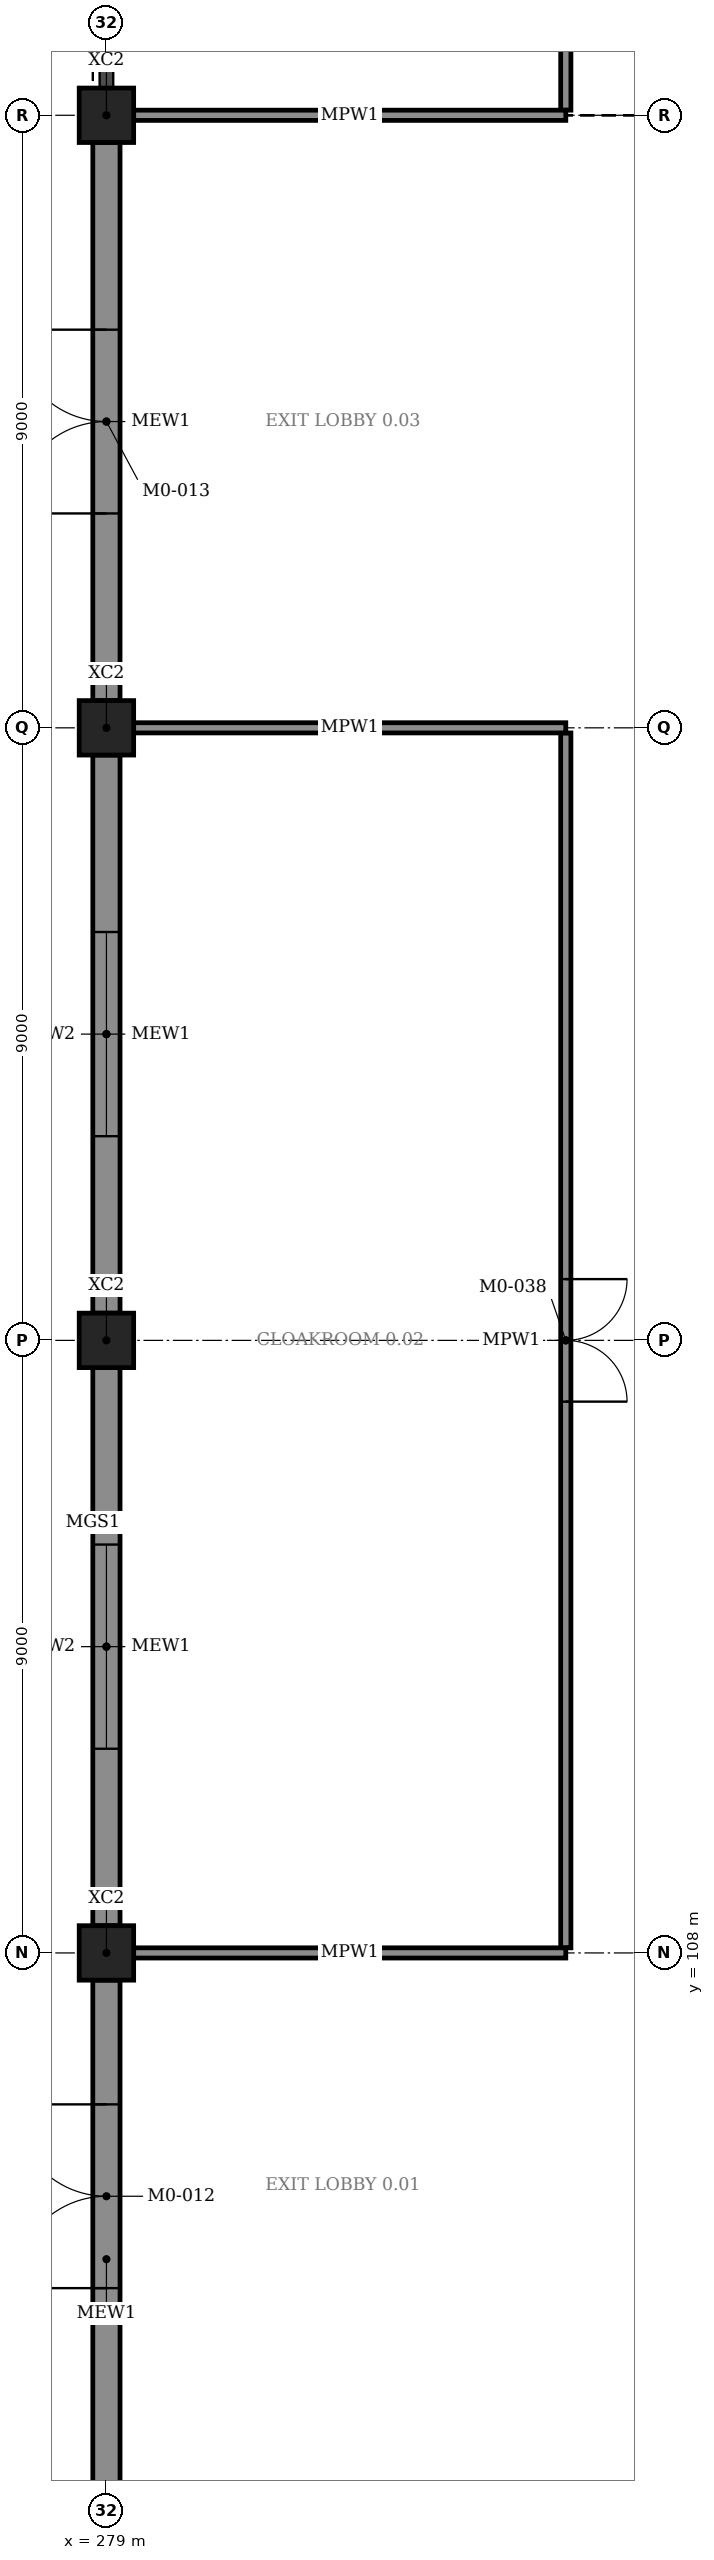
"""IFC4 building model, lengths in metres.
Left out: names, types, materials, properties, quantities, classifications, styles, units other than length and angle.
Written with IfcOpenShell. Run it as: python <this file> out.ifc"""

import sys

from ifc_helpers import new_model, si_unit, direction, frame, frame_2d, origin, origin_2d, place, context, subcontext, project, spatial, rectangle, extrude, element, fill, save


model = new_model("IFC4")
c1 = context("Model", 3, precision=1e-05, world=origin(), true_north=direction((0.0, 1.0)))
c2 = subcontext(c1, "Body", "Model", "MODEL_VIEW")
j1 = project(units=[si_unit("LENGTHUNIT", "METRE"), si_unit("PLANEANGLEUNIT", "RADIAN")], contexts=[c1])
p1 = place(None, origin())
s1 = spatial("IfcSite", under=j1, at=p1, CompositionType="ELEMENT")
p2 = place(p1, origin())
s2 = spatial("IfcBuilding", under=s1, at=p2, CompositionType="ELEMENT")
p3 = place(p2, origin())
s3 = spatial("IfcBuildingStorey", under=s2, at=p3, CompositionType="ELEMENT", Elevation=0.0)
for number, where, z_axis, x_axis in (
    (1, (279.0, 108.0, -0.3), (0.0, 0.0, 1.0), (1.0, 0.0, 0.0)),
    (2, (279.0, 117.0, -0.3), (0.0, 0.0, 1.0), (1.0, 0.0, 0.0)),
    (3, (279.0, 126.0, -0.3), (0.0, 0.0, 1.0), (1.0, 0.0, 0.0)),
    (4, (279.0, 135.0, -0.3), (0.0, 0.0, 1.0), (1.0, 0.0, 0.0)),
):
    element("IfcColumn", number, at=place(p3, frame(where, z_axis=z_axis, x_axis=x_axis)), inside=s3, PredefinedType="COLUMN", context=c2, shape_type="SweptSolid", body=[
        extrude(rectangle(XDim=0.8, YDim=0.8, at=origin_2d()), origin(), (0.0, 0.0, 1.0), 6.3),
    ])
p4 = place(p3, frame((279.0, 99.4, 0.0), z_axis=(0.0, 0.0, 1.0), x_axis=(0.0, 1.0, 0.0)))
e5 = element("IfcWall", 5, at=p4, inside=s3, PredefinedType="STANDARD", context=c2, shape_type="SweptSolid", body=[
    extrude(rectangle(XDim=8.2, YDim=0.4, at=frame_2d((4.1, 0.0))), origin(), (0.0, 0.0, 1.0), 4.82),
])
p5 = place(p4, frame((3.675, 0.0, 0.0)))
e6 = element("IfcOpeningElement", 6, at=p5, cuts=e5, PredefinedType="OPENING", context=c2, shape_type="SweptSolid", body=[
    extrude(rectangle(XDim=2.7, YDim=2.4, at=frame_2d((1.35, 1.2))), frame((0.0, 0.21, 0.0), z_axis=(0.0, -1.0, 0.0), x_axis=(1.0, 0.0, 0.0)), (0.0, 0.0, 1.0), 0.42),
])
p6 = place(p3, frame((279.0, 108.4, 0.0), z_axis=(0.0, 0.0, 1.0), x_axis=(0.0, 1.0, 0.0)))
e7 = element("IfcWall", 7, at=p6, inside=s3, PredefinedType="STANDARD", context=c2, shape_type="SweptSolid", body=[
    extrude(rectangle(XDim=8.2, YDim=0.4, at=frame_2d((4.1, 0.0))), origin(), (0.0, 0.0, 1.0), 4.82),
])
p7 = place(p6, frame((2.6, 0.0, 0.9)))
e8 = element("IfcOpeningElement", 8, at=p7, cuts=e7, PredefinedType="OPENING", context=c2, shape_type="SweptSolid", body=[
    extrude(rectangle(XDim=3.0, YDim=2.1, at=frame_2d((1.5, 1.05))), frame((0.0, 0.21, 0.0), z_axis=(0.0, -1.0, 0.0), x_axis=(1.0, 0.0, 0.0)), (0.0, 0.0, 1.0), 0.42),
])
p8 = place(p3, frame((279.0, 117.4, 0.0), z_axis=(0.0, 0.0, 1.0), x_axis=(0.0, 1.0, 0.0)))
e9 = element("IfcWall", 9, at=p8, inside=s3, PredefinedType="STANDARD", context=c2, shape_type="SweptSolid", body=[
    extrude(rectangle(XDim=8.2, YDim=0.4, at=frame_2d((4.1, 0.0))), origin(), (0.0, 0.0, 1.0), 4.82),
])
p9 = place(p8, frame((2.6, 0.0, 0.9)))
e10 = element("IfcOpeningElement", 10, at=p9, cuts=e9, PredefinedType="OPENING", context=c2, shape_type="SweptSolid", body=[
    extrude(rectangle(XDim=3.0, YDim=2.1, at=frame_2d((1.5, 1.05))), frame((0.0, 0.21, 0.0), z_axis=(0.0, -1.0, 0.0), x_axis=(1.0, 0.0, 0.0)), (0.0, 0.0, 1.0), 0.42),
])
p10 = place(p3, frame((279.0, 126.4, 0.0), z_axis=(0.0, 0.0, 1.0), x_axis=(0.0, 1.0, 0.0)))
e11 = element("IfcWall", 11, at=p10, inside=s3, PredefinedType="STANDARD", context=c2, shape_type="SweptSolid", body=[
    extrude(rectangle(XDim=8.2, YDim=0.4, at=frame_2d((4.1, 0.0))), origin(), (0.0, 0.0, 1.0), 4.82),
])
p11 = place(p10, frame((2.75, 0.0, 0.0)))
e12 = element("IfcOpeningElement", 12, at=p11, cuts=e11, PredefinedType="OPENING", context=c2, shape_type="SweptSolid", body=[
    extrude(rectangle(XDim=2.7, YDim=2.4, at=frame_2d((1.35, 1.2))), frame((0.0, 0.21, 0.0), z_axis=(0.0, -1.0, 0.0), x_axis=(1.0, 0.0, 0.0)), (0.0, 0.0, 1.0), 0.42),
])
for number, where, z_axis, x_axis in (
    (13, (279.4, 108.0, 0.0), (0.0, 0.0, 1.0), (1.0, 0.0, 0.0)),
    (14, (279.4, 126.0, 0.0), (0.0, 0.0, 1.0), (1.0, 0.0, 0.0)),
):
    element("IfcWall", number, at=place(p3, frame(where, z_axis=z_axis, x_axis=x_axis)), inside=s3, PredefinedType="PARTITIONING", context=c2, shape_type="SweptSolid", body=[
        extrude(rectangle(XDim=6.35, YDim=0.15, at=frame_2d((3.175, 0.0))), origin(), (0.0, 0.0, 1.0), 4.82),
    ])
p12 = place(p3, frame((285.75, 108.075, 0.0), z_axis=(0.0, 0.0, 1.0), x_axis=(0.0, 1.0, 0.0)))
e15 = element("IfcWall", 15, at=p12, inside=s3, PredefinedType="PARTITIONING", context=c2, shape_type="SweptSolid", body=[
    extrude(rectangle(XDim=17.85, YDim=0.15, at=frame_2d((8.925, 0.0))), origin(), (0.0, 0.0, 1.0), 4.82),
])
p13 = place(p12, frame((8.025, 0.0, 0.0)))
e16 = element("IfcOpeningElement", 16, at=p13, cuts=e15, PredefinedType="OPENING", context=c2, shape_type="SweptSolid", body=[
    extrude(rectangle(XDim=1.8, YDim=2.4, at=frame_2d((0.9, 1.2))), frame((0.0, 0.085, 0.0), z_axis=(0.0, -1.0, 0.0), x_axis=(1.0, 0.0, 0.0)), (0.0, 0.0, 1.0), 0.17),
])
p14 = place(p3, frame((279.4, 135.0, 0.0), z_axis=(0.0, 0.0, 1.0), x_axis=(1.0, 0.0, 0.0)))
e17 = element("IfcWall", 17, at=p14, inside=s3, PredefinedType="PARTITIONING", context=c2, shape_type="SweptSolid", body=[
    extrude(rectangle(XDim=6.35, YDim=0.15, at=frame_2d((3.175, 0.0))), origin(), (0.0, 0.0, 1.0), 4.82),
])
p15 = place(p3, frame((285.75, 135.075, 0.0), z_axis=(0.0, 0.0, 1.0), x_axis=(0.0, 1.0, 0.0)))
e18 = element("IfcWall", 18, at=p15, inside=s3, PredefinedType="PARTITIONING", context=c2, shape_type="SweptSolid", body=[
    extrude(rectangle(XDim=17.85, YDim=0.15, at=frame_2d((8.925, 0.0))), origin(), (0.0, 0.0, 1.0), 4.82),
])
p16 = place(p15, frame((8.025, 0.0, 0.0)))
e19 = element("IfcOpeningElement", 19, at=p16, cuts=e18, PredefinedType="OPENING", context=c2, shape_type="SweptSolid", body=[
    extrude(rectangle(XDim=1.8, YDim=2.4, at=frame_2d((0.9, 1.2))), frame((0.0, 0.085, 0.0), z_axis=(0.0, -1.0, 0.0), x_axis=(1.0, 0.0, 0.0)), (0.0, 0.0, 1.0), 0.17),
])
p17 = place(p5, origin())
e20 = element("IfcDoor", 20, at=p17, inside=s3, OperationType="DOUBLE_DOOR_SINGLE_SWING", PredefinedType="DOOR", context=c2, shape_type="SweptSolid", body=[
    extrude(rectangle(XDim=2.7, YDim=2.4, at=frame_2d((1.35, 1.2))), frame((0.0, 0.025, 0.0), z_axis=(0.0, -1.0, 0.0), x_axis=(1.0, 0.0, 0.0)), (0.0, 0.0, 1.0), 0.05),
])
fill(e6, e20)
p18 = place(p7, origin())
e21 = element("IfcWindow", 21, at=p18, inside=s3, PartitioningType="TRIPLE_PANEL_VERTICAL", PredefinedType="WINDOW", context=c2, shape_type="SweptSolid", body=[
    extrude(rectangle(XDim=3.0, YDim=2.1, at=frame_2d((1.5, 1.05))), frame((0.0, 0.03, 0.0), z_axis=(0.0, -1.0, 0.0), x_axis=(1.0, 0.0, 0.0)), (0.0, 0.0, 1.0), 0.06),
])
fill(e8, e21)
p19 = place(p9, origin())
e22 = element("IfcWindow", 22, at=p19, inside=s3, PartitioningType="TRIPLE_PANEL_VERTICAL", PredefinedType="WINDOW", context=c2, shape_type="SweptSolid", body=[
    extrude(rectangle(XDim=3.0, YDim=2.1, at=frame_2d((1.5, 1.05))), frame((0.0, 0.03, 0.0), z_axis=(0.0, -1.0, 0.0), x_axis=(1.0, 0.0, 0.0)), (0.0, 0.0, 1.0), 0.06),
])
fill(e10, e22)
p20 = place(p11, origin())
e23 = element("IfcDoor", 23, at=p20, inside=s3, OperationType="DOUBLE_DOOR_SINGLE_SWING", PredefinedType="DOOR", context=c2, shape_type="SweptSolid", body=[
    extrude(rectangle(XDim=2.7, YDim=2.4, at=frame_2d((1.35, 1.2))), frame((0.0, 0.025, 0.0), z_axis=(0.0, -1.0, 0.0), x_axis=(1.0, 0.0, 0.0)), (0.0, 0.0, 1.0), 0.05),
])
fill(e12, e23)
p21 = place(p13, frame((1.8, 0.0, 0.0), z_axis=(0.0, 0.0, 1.0), x_axis=(-1.0, 0.0, 0.0)))
e24 = element("IfcDoor", 24, at=p21, inside=s3, OperationType="DOUBLE_DOOR_SINGLE_SWING", PredefinedType="DOOR", context=c2, shape_type="SweptSolid", body=[
    extrude(rectangle(XDim=1.8, YDim=2.4, at=frame_2d((0.9, 1.2))), frame((0.0, 0.025, 0.0), z_axis=(0.0, -1.0, 0.0), x_axis=(1.0, 0.0, 0.0)), (0.0, 0.0, 1.0), 0.05),
])
fill(e16, e24)
save(model, sys.argv[1])
